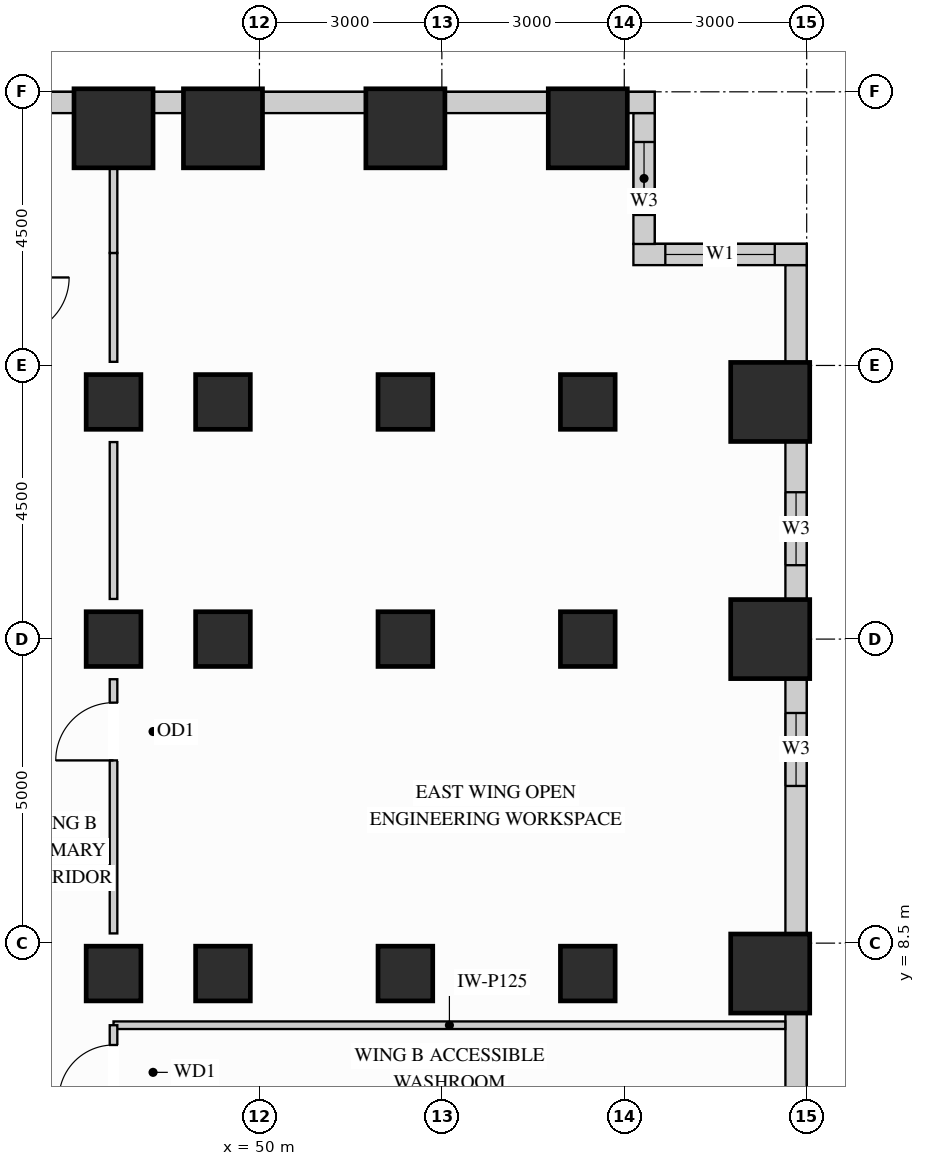
"""IFC4 building model, lengths in metres.
Left out: names, types, materials, properties, quantities, classifications, styles, units other than length and angle.
Written with IfcOpenShell. Run it as: python <this file> out.ifc"""

import sys

from ifc_helpers import new_model, si_unit, direction, frame, frame_2d, origin, origin_2d, place, context, subcontext, project, spatial, rectangle, extrude, source, transform, mapped, element, fill, save


model = new_model("IFC4")
c1 = context("Model", 3, precision=1e-05, world=origin(), true_north=direction((0.0, 1.0)))
c2 = subcontext(c1, "Body", "Model", "MODEL_VIEW")
j1 = project(units=[si_unit("LENGTHUNIT", "METRE"), si_unit("PLANEANGLEUNIT", "RADIAN")], contexts=[c1])
p1 = place(None, origin())
s1 = spatial("IfcSite", under=j1, at=p1, CompositionType="ELEMENT")
p2 = place(p1, origin())
s2 = spatial("IfcBuilding", under=s1, at=p2, CompositionType="ELEMENT")
p3 = place(p2, frame((0.0, 0.0, 58.5)))
s3 = spatial("IfcBuildingStorey", under=s2, at=p3, CompositionType="ELEMENT", Elevation=58.5)
m1 = source(origin(), c2, "Body", "SweptSolid", [
    extrude(rectangle(XDim=0.9, YDim=0.9, at=origin_2d()), origin(), (0.0, 0.0, 1.0), 3.38),
])
for number, where, z_axis, x_axis in (
    (1, (47.6, 13.5, 0.0), (0.0, 0.0, 1.0), (1.0, 0.0, 0.0)),
    (2, (47.6, 8.0, 0.0), (0.0, 0.0, 1.0), (1.0, 0.0, 0.0)),
    (3, (47.6, 17.4, 0.0), (0.0, 0.0, 1.0), (1.0, 0.0, 0.0)),
    (4, (49.4, 13.5, 0.0), (0.0, 0.0, 1.0), (1.0, 0.0, 0.0)),
    (5, (49.4, 17.4, 0.0), (0.0, 0.0, 1.0), (1.0, 0.0, 0.0)),
    (6, (49.4, 8.0, 0.0), (0.0, 0.0, 1.0), (1.0, 0.0, 0.0)),
    (7, (52.4, 13.5, 0.0), (0.0, 0.0, 1.0), (1.0, 0.0, 0.0)),
    (8, (52.4, 17.4, 0.0), (0.0, 0.0, 1.0), (1.0, 0.0, 0.0)),
    (9, (52.4, 8.0, 0.0), (0.0, 0.0, 1.0), (1.0, 0.0, 0.0)),
    (10, (55.4, 13.5, 0.0), (0.0, 0.0, 1.0), (1.0, 0.0, 0.0)),
    (11, (55.4, 17.4, 0.0), (0.0, 0.0, 1.0), (1.0, 0.0, 0.0)),
    (12, (55.4, 8.0, 0.0), (0.0, 0.0, 1.0), (1.0, 0.0, 0.0)),
):
    element("IfcColumn", number, at=place(p3, frame(where, z_axis=z_axis, x_axis=x_axis)), inside=s3, PredefinedType="COLUMN", context=c2, shape_type="MappedRepresentation", body=[
        mapped(m1, transform((0.0, 0.0, 0.0), x_axis=(1.0, 0.0, 0.0), y_axis=(0.0, 1.0, 0.0), z_axis=(0.0, 0.0, 1.0))),
    ])
m2 = source(origin(), c2, "Body", "SweptSolid", [
    extrude(rectangle(XDim=1.3, YDim=1.3, at=origin_2d()), origin(), (0.0, 0.0, 1.0), 3.38),
])
for number, where, z_axis, x_axis in (
    (13, (47.6, 21.9, 0.0), (0.0, 0.0, 1.0), (1.0, 0.0, 0.0)),
    (14, (49.4, 21.9, 0.0), (0.0, 0.0, 1.0), (1.0, 0.0, 0.0)),
    (15, (52.4, 21.9, 0.0), (0.0, 0.0, 1.0), (1.0, 0.0, 0.0)),
    (16, (55.4, 21.9, 0.0), (0.0, 0.0, 1.0), (1.0, 0.0, 0.0)),
    (17, (58.4, 13.5, 0.0), (0.0, 0.0, 1.0), (1.0, 0.0, 0.0)),
    (18, (58.4, 17.4, 0.0), (0.0, 0.0, 1.0), (1.0, 0.0, 0.0)),
    (19, (58.4, 8.0, 0.0), (0.0, 0.0, 1.0), (1.0, 0.0, 0.0)),
):
    element("IfcColumn", number, at=place(p3, frame(where, z_axis=z_axis, x_axis=x_axis)), inside=s3, PredefinedType="COLUMN", context=c2, shape_type="MappedRepresentation", body=[
        mapped(m2, transform((0.0, 0.0, 0.0), x_axis=(1.0, 0.0, 0.0), y_axis=(0.0, 1.0, 0.0), z_axis=(0.0, 0.0, 1.0))),
    ])
m3 = source(origin(), c2, "Body", "SweptSolid", [
    extrude(rectangle(XDim=3.204, YDim=0.35, at=frame_2d((1.602, 0.0))), origin(), (0.0, 0.0, 1.0), 2.51),
])
p4 = place(p3, frame((58.825, 4.148, 0.0), z_axis=(0.0, 0.0, 1.0), x_axis=(0.0, 1.0, 0.0)))
e20 = element("IfcWall", 20, at=p4, inside=s3, PredefinedType="SOLIDWALL", context=c2, shape_type="MappedRepresentation", body=[
    mapped(m3, transform((0.0, 0.0, 0.0), x_axis=(1.0, 0.0, 0.0), y_axis=(0.0, 1.0, 0.0), z_axis=(0.0, 0.0, 1.0))),
])
p5 = place(p3, frame((58.825, 8.648, 0.0), z_axis=(0.0, 0.0, 1.0), x_axis=(0.0, 1.0, 0.0)))
e21 = element("IfcWall", 21, at=p5, inside=s3, PredefinedType="SOLIDWALL", context=c2, shape_type="SweptSolid", body=[
    extrude(rectangle(XDim=4.204, YDim=0.35, at=frame_2d((2.102, 0.0))), origin(), (0.0, 0.0, 1.0), 2.51),
])
p6 = place(p5, frame((2.437, 0.0, 0.78)))
e22 = element("IfcOpeningElement", 22, at=p6, cuts=e21, PredefinedType="OPENING", context=c2, shape_type="SweptSolid", body=[
    extrude(rectangle(XDim=1.2, YDim=1.55, at=frame_2d((0.6, 0.775))), frame((0.0, 0.185, 0.0), z_axis=(0.0, -1.0, 0.0), x_axis=(1.0, 0.0, 0.0)), (0.0, 0.0, 1.0), 0.37),
])
p7 = place(p3, frame((58.825, 14.148, 0.0), z_axis=(0.0, 0.0, 1.0), x_axis=(0.0, 1.0, 0.0)))
e23 = element("IfcWall", 23, at=p7, inside=s3, PredefinedType="SOLIDWALL", context=c2, shape_type="SweptSolid", body=[
    extrude(rectangle(XDim=2.604, YDim=0.35, at=frame_2d((1.302, 0.0))), origin(), (0.0, 0.0, 1.0), 2.51),
])
p8 = place(p7, frame((0.567, 0.0, 0.78)))
e24 = element("IfcOpeningElement", 24, at=p8, cuts=e23, PredefinedType="OPENING", context=c2, shape_type="SweptSolid", body=[
    extrude(rectangle(XDim=1.2, YDim=1.55, at=frame_2d((0.6, 0.775))), frame((0.0, 0.185, 0.0), z_axis=(0.0, -1.0, 0.0), x_axis=(1.0, 0.0, 0.0)), (0.0, 0.0, 1.0), 0.37),
])
m4 = source(origin(), c2, "Body", "SweptSolid", [
    extrude(rectangle(XDim=1.604, YDim=0.35, at=frame_2d((0.802, 0.0))), origin(), (0.0, 0.0, 1.0), 3.365),
])
p9 = place(p3, frame((58.825, 18.048, 0.0), z_axis=(0.0, 0.0, 1.0), x_axis=(0.0, 1.0, 0.0)))
e25 = element("IfcWall", 25, at=p9, inside=s3, PredefinedType="SOLIDWALL", context=c2, shape_type="MappedRepresentation", body=[
    mapped(m4, transform((0.0, 0.0, 0.0), x_axis=(1.0, 0.0, 0.0), y_axis=(0.0, 1.0, 0.0), z_axis=(0.0, 0.0, 1.0))),
])
p10 = place(p3, frame((59.0, 19.825, 0.0), z_axis=(0.0, 0.0, 1.0), x_axis=(-1.0, 0.0, 0.0)))
e26 = element("IfcWall", 26, at=p10, inside=s3, PredefinedType="SOLIDWALL", context=c2, shape_type="SweptSolid", body=[
    extrude(rectangle(XDim=2.85, YDim=0.35, at=frame_2d((1.425, 0.0))), origin(), (0.0, 0.0, 1.0), 3.365),
])
p11 = place(p10, frame((0.525, 0.0, 0.78)))
e27 = element("IfcOpeningElement", 27, at=p11, cuts=e26, PredefinedType="OPENING", context=c2, shape_type="SweptSolid", body=[
    extrude(rectangle(XDim=1.8, YDim=2.1, at=frame_2d((0.9, 1.05))), frame((0.0, 0.185, 0.0), z_axis=(0.0, -1.0, 0.0), x_axis=(1.0, 0.0, 0.0)), (0.0, 0.0, 1.0), 0.37),
])
p12 = place(p3, frame((56.325, 19.998, 0.0), z_axis=(0.0, 0.0, 1.0), x_axis=(0.0, 1.0, 0.0)))
e28 = element("IfcWall", 28, at=p12, inside=s3, PredefinedType="SOLIDWALL", context=c2, shape_type="SweptSolid", body=[
    extrude(rectangle(XDim=2.154, YDim=0.35, at=frame_2d((1.077, 0.0))), origin(), (0.0, 0.0, 1.0), 3.365),
])
p13 = place(p12, frame((0.477, 0.0, 0.78)))
e29 = element("IfcOpeningElement", 29, at=p13, cuts=e28, PredefinedType="OPENING", context=c2, shape_type="SweptSolid", body=[
    extrude(rectangle(XDim=1.2, YDim=2.1, at=frame_2d((0.6, 1.05))), frame((0.0, 0.185, 0.0), z_axis=(0.0, -1.0, 0.0), x_axis=(1.0, 0.0, 0.0)), (0.0, 0.0, 1.0), 0.37),
])
m5 = source(origin(), c2, "Body", "SweptSolid", [
    extrude(rectangle(XDim=0.452, YDim=0.35, at=frame_2d((0.226, 0.0))), origin(), (0.0, 0.0, 1.0), 3.365),
])
p14 = place(p3, frame((56.5, 22.325, 0.0), z_axis=(0.0, 0.0, 1.0), x_axis=(-1.0, 0.0, 0.0)))
e30 = element("IfcWall", 30, at=p14, inside=s3, PredefinedType="SOLIDWALL", context=c2, shape_type="MappedRepresentation", body=[
    mapped(m5, transform((0.0, 0.0, 0.0), x_axis=(1.0, 0.0, 0.0), y_axis=(0.0, 1.0, 0.0), z_axis=(0.0, 0.0, 1.0))),
])
m6 = source(origin(), c2, "Body", "SweptSolid", [
    extrude(rectangle(XDim=1.704, YDim=0.35, at=frame_2d((0.852, 0.0))), origin(), (0.0, 0.0, 1.0), 2.51),
])
for number, where, z_axis, x_axis in (
    (31, (54.752, 22.325, 0.0), (0.0, 0.0, 1.0), (-1.0, 0.0, 0.0)),
    (32, (51.752, 22.325, 0.0), (0.0, 0.0, 1.0), (-1.0, 0.0, 0.0)),
):
    element("IfcWall", number, at=place(p3, frame(where, z_axis=z_axis, x_axis=x_axis)), inside=s3, PredefinedType="SOLIDWALL", context=c2, shape_type="MappedRepresentation", body=[
        mapped(m6, transform((0.0, 0.0, 0.0), x_axis=(1.0, 0.0, 0.0), y_axis=(0.0, 1.0, 0.0), z_axis=(0.0, 0.0, 1.0))),
    ])
m7 = source(origin(), c2, "Body", "SweptSolid", [
    extrude(rectangle(XDim=0.504, YDim=0.35, at=frame_2d((0.252, 0.0))), origin(), (0.0, 0.0, 1.0), 3.365),
])
p15 = place(p3, frame((48.752, 22.325, 0.0), z_axis=(0.0, 0.0, 1.0), x_axis=(-1.0, 0.0, 0.0)))
e33 = element("IfcWall", 33, at=p15, inside=s3, PredefinedType="SOLIDWALL", context=c2, shape_type="MappedRepresentation", body=[
    mapped(m7, transform((0.0, 0.0, 0.0), x_axis=(1.0, 0.0, 0.0), y_axis=(0.0, 1.0, 0.0), z_axis=(0.0, 0.0, 1.0))),
])
p16 = place(p3, frame((46.952, 22.325, 0.0), z_axis=(0.0, 0.0, 1.0), x_axis=(-1.0, 0.0, 0.0)))
e34 = element("IfcWall", 34, at=p16, inside=s3, PredefinedType="SOLIDWALL", context=c2, shape_type="SweptSolid", body=[
    extrude(rectangle(XDim=6.304, YDim=0.35, at=frame_2d((3.152, 0.0))), origin(), (0.0, 0.0, 1.0), 2.51),
])
p17 = place(p16, frame((1.649, 0.0, 0.78)))
e35 = element("IfcOpeningElement", 35, at=p17, cuts=e34, PredefinedType="OPENING", context=c2, shape_type="SweptSolid", body=[
    extrude(rectangle(XDim=1.8, YDim=1.55, at=frame_2d((0.9, 0.775))), frame((0.0, 0.185, 0.0), z_axis=(0.0, -1.0, 0.0), x_axis=(1.0, 0.0, 0.0)), (0.0, 0.0, 1.0), 0.37),
])
p18 = place(p16, frame((3.817, 0.0, 0.78)))
e36 = element("IfcOpeningElement", 36, at=p18, cuts=e34, PredefinedType="OPENING", context=c2, shape_type="SweptSolid", body=[
    extrude(rectangle(XDim=1.8, YDim=1.55, at=frame_2d((0.9, 0.775))), frame((0.0, 0.185, 0.0), z_axis=(0.0, -1.0, 0.0), x_axis=(1.0, 0.0, 0.0)), (0.0, 0.0, 1.0), 0.37),
])
m8 = source(origin(), c2, "Body", "SweptSolid", [
    extrude(rectangle(XDim=11.048, YDim=0.125, at=frame_2d((5.524, 0.0))), origin(), (0.0, 0.0, 1.0), 3.365),
])
p19 = place(p3, frame((47.6, 7.15, 0.0), z_axis=(0.0, 0.0, 1.0), x_axis=(1.0, 0.0, 0.0)))
e37 = element("IfcWall", 37, at=p19, inside=s3, PredefinedType="PARTITIONING", context=c2, shape_type="MappedRepresentation", body=[
    mapped(m8, transform((0.0, 0.0, 0.0), x_axis=(1.0, 0.0, 0.0), y_axis=(0.0, 1.0, 0.0), z_axis=(0.0, 0.0, 1.0))),
])
p20 = place(p3, frame((47.6, 8.66, 0.0), z_axis=(0.0, 0.0, 1.0), x_axis=(0.0, 1.0, 0.0)))
e38 = element("IfcWall", 38, at=p20, inside=s3, PredefinedType="PARTITIONING", context=c2, shape_type="SweptSolid", body=[
    extrude(rectangle(XDim=4.18, YDim=0.125, at=frame_2d((2.09, 0.0))), origin(), (0.0, 0.0, 1.0), 2.67),
])
p21 = place(p20, frame((2.845, 0.0, 0.0)))
e39 = element("IfcOpeningElement", 39, at=p21, cuts=e38, PredefinedType="OPENING", context=c2, shape_type="SweptSolid", body=[
    extrude(rectangle(XDim=0.95, YDim=2.15, at=frame_2d((0.475, 1.075))), frame((0.0, 0.073, 0.0), z_axis=(0.0, -1.0, 0.0), x_axis=(1.0, 0.0, 0.0)), (0.0, 0.0, 1.0), 0.145),
])
m9 = source(origin(), c2, "Body", "SweptSolid", [
    extrude(rectangle(XDim=2.58, YDim=0.125, at=frame_2d((1.29, 0.0))), origin(), (0.0, 0.0, 1.0), 2.67),
])
p22 = place(p3, frame((47.6, 14.16, 0.0), z_axis=(0.0, 0.0, 1.0), x_axis=(0.0, 1.0, 0.0)))
e40 = element("IfcWall", 40, at=p22, inside=s3, PredefinedType="PARTITIONING", context=c2, shape_type="MappedRepresentation", body=[
    mapped(m9, transform((0.0, 0.0, 0.0), x_axis=(1.0, 0.0, 0.0), y_axis=(0.0, 1.0, 0.0), z_axis=(0.0, 0.0, 1.0))),
])
m10 = source(origin(), c2, "Body", "SweptSolid", [
    extrude(rectangle(XDim=1.79, YDim=0.125, at=frame_2d((0.895, 0.0))), origin(), (0.0, 0.0, 1.0), 2.67),
])
p23 = place(p3, frame((47.6, 18.06, 0.0), z_axis=(0.0, 0.0, 1.0), x_axis=(0.0, 1.0, 0.0)))
e41 = element("IfcWall", 41, at=p23, inside=s3, PredefinedType="PARTITIONING", context=c2, shape_type="MappedRepresentation", body=[
    mapped(m10, transform((0.0, 0.0, 0.0), x_axis=(1.0, 0.0, 0.0), y_axis=(0.0, 1.0, 0.0), z_axis=(0.0, 0.0, 1.0))),
])
m11 = source(origin(), c2, "Body", "SweptSolid", [
    extrude(rectangle(XDim=1.39, YDim=0.125, at=frame_2d((0.695, 0.0))), origin(), (0.0, 0.0, 1.0), 2.67),
])
p24 = place(p3, frame((47.6, 19.85, 0.0), z_axis=(0.0, 0.0, 1.0), x_axis=(0.0, 1.0, 0.0)))
e42 = element("IfcWall", 42, at=p24, inside=s3, PredefinedType="PARTITIONING", context=c2, shape_type="MappedRepresentation", body=[
    mapped(m11, transform((0.0, 0.0, 0.0), x_axis=(1.0, 0.0, 0.0), y_axis=(0.0, 1.0, 0.0), z_axis=(0.0, 0.0, 1.0))),
])
p25 = place(p3, frame((47.6, 5.65, 0.0), z_axis=(0.0, 0.0, 1.0), x_axis=(0.0, 1.0, 0.0)))
e43 = element("IfcWall", 43, at=p25, inside=s3, PredefinedType="PARTITIONING", context=c2, shape_type="SweptSolid", body=[
    extrude(rectangle(XDim=1.5, YDim=0.125, at=frame_2d((0.75, 0.0))), origin(), (0.0, 0.0, 1.0), 2.67),
])
p26 = place(p25, frame((0.275, 0.0, 0.0)))
e44 = element("IfcOpeningElement", 44, at=p26, cuts=e43, PredefinedType="OPENING", context=c2, shape_type="SweptSolid", body=[
    extrude(rectangle(XDim=0.9, YDim=2.15, at=frame_2d((0.45, 1.075))), frame((0.0, 0.073, 0.0), z_axis=(0.0, -1.0, 0.0), x_axis=(1.0, 0.0, 0.0)), (0.0, 0.0, 1.0), 0.145),
])
m12 = source(origin(), c2, "Body", "SweptSolid", [
    extrude(rectangle(XDim=0.95, YDim=2.15, at=frame_2d((0.475, 1.075))), frame((0.0, 0.025, 0.0), z_axis=(0.0, -1.0, 0.0), x_axis=(1.0, 0.0, 0.0)), (0.0, 0.0, 1.0), 0.05),
])
p27 = place(p21, origin())
e45 = element("IfcDoor", 45, at=p27, inside=s3, OperationType="SINGLE_SWING_LEFT", PredefinedType="DOOR", context=c2, shape_type="MappedRepresentation", body=[
    mapped(m12, transform((0.0, 0.0, 0.0), x_axis=(1.0, 0.0, 0.0), y_axis=(0.0, 1.0, 0.0), z_axis=(0.0, 0.0, 1.0))),
])
fill(e39, e45)
m13 = source(origin(), c2, "Body", "SweptSolid", [
    extrude(rectangle(XDim=0.9, YDim=2.15, at=frame_2d((0.45, 1.075))), frame((0.0, 0.025, 0.0), z_axis=(0.0, -1.0, 0.0), x_axis=(1.0, 0.0, 0.0)), (0.0, 0.0, 1.0), 0.05),
])
p28 = place(p26, origin())
e46 = element("IfcDoor", 46, at=p28, inside=s3, OperationType="SINGLE_SWING_LEFT", PredefinedType="DOOR", context=c2, shape_type="MappedRepresentation", body=[
    mapped(m13, transform((0.0, 0.0, 0.0), x_axis=(1.0, 0.0, 0.0), y_axis=(0.0, 1.0, 0.0), z_axis=(0.0, 0.0, 1.0))),
])
fill(e44, e46)
m14 = source(origin(), c2, "Body", "SweptSolid", [
    extrude(rectangle(XDim=1.8, YDim=2.1, at=frame_2d((0.9, 1.05))), frame((0.0, 0.03, 0.0), z_axis=(0.0, -1.0, 0.0), x_axis=(1.0, 0.0, 0.0)), (0.0, 0.0, 1.0), 0.06),
])
p29 = place(p11, origin())
e47 = element("IfcWindow", 47, at=p29, inside=s3, PartitioningType="SINGLE_PANEL", PredefinedType="WINDOW", context=c2, shape_type="MappedRepresentation", body=[
    mapped(m14, transform((0.0, 0.0, 0.0), x_axis=(1.0, 0.0, 0.0), y_axis=(0.0, 1.0, 0.0), z_axis=(0.0, 0.0, 1.0))),
])
fill(e27, e47)
m15 = source(origin(), c2, "Body", "SweptSolid", [
    extrude(rectangle(XDim=1.2, YDim=1.55, at=frame_2d((0.6, 0.775))), frame((0.0, 0.03, 0.0), z_axis=(0.0, -1.0, 0.0), x_axis=(1.0, 0.0, 0.0)), (0.0, 0.0, 1.0), 0.06),
])
p30 = place(p6, origin())
e48 = element("IfcWindow", 48, at=p30, inside=s3, PartitioningType="SINGLE_PANEL", PredefinedType="WINDOW", context=c2, shape_type="MappedRepresentation", body=[
    mapped(m15, transform((0.0, 0.0, 0.0), x_axis=(1.0, 0.0, 0.0), y_axis=(0.0, 1.0, 0.0), z_axis=(0.0, 0.0, 1.0))),
])
fill(e22, e48)
p31 = place(p8, origin())
e49 = element("IfcWindow", 49, at=p31, inside=s3, PartitioningType="SINGLE_PANEL", PredefinedType="WINDOW", context=c2, shape_type="MappedRepresentation", body=[
    mapped(m15, transform((0.0, 0.0, 0.0), x_axis=(1.0, 0.0, 0.0), y_axis=(0.0, 1.0, 0.0), z_axis=(0.0, 0.0, 1.0))),
])
fill(e24, e49)
m16 = source(origin(), c2, "Body", "SweptSolid", [
    extrude(rectangle(XDim=1.2, YDim=2.1, at=frame_2d((0.6, 1.05))), frame((0.0, 0.03, 0.0), z_axis=(0.0, -1.0, 0.0), x_axis=(1.0, 0.0, 0.0)), (0.0, 0.0, 1.0), 0.06),
])
p32 = place(p13, origin())
e50 = element("IfcWindow", 50, at=p32, inside=s3, PartitioningType="SINGLE_PANEL", PredefinedType="WINDOW", context=c2, shape_type="MappedRepresentation", body=[
    mapped(m16, transform((0.0, 0.0, 0.0), x_axis=(1.0, 0.0, 0.0), y_axis=(0.0, 1.0, 0.0), z_axis=(0.0, 0.0, 1.0))),
])
fill(e29, e50)
save(model, sys.argv[1])
